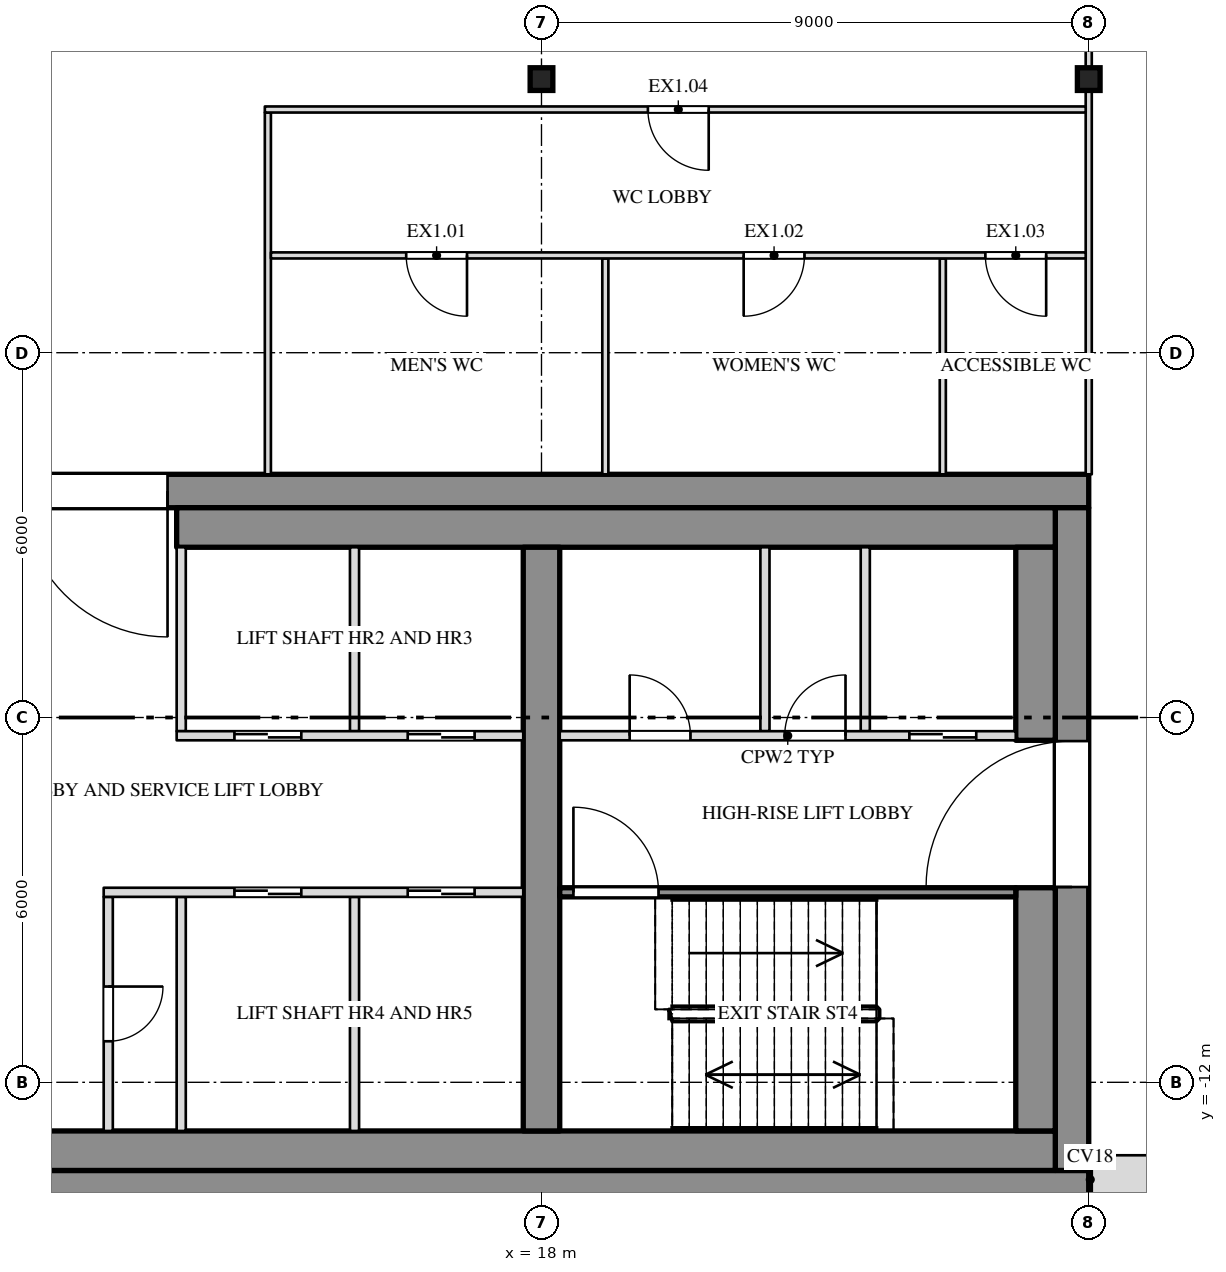
"""IFC4 building model, lengths in metres.
Left out: names, types, materials, properties, quantities, classifications, styles, units other than length and angle.
Written with IfcOpenShell. Run it as: python <this file> out.ifc"""

import sys

from ifc_helpers import new_model, si_unit, direction, frame, frame_2d, origin, origin_2d, place, context, subcontext, project, spatial, rectangle, i_section, extrude, element, fill, save


model = new_model("IFC4")
c1 = context("Model", 3, precision=1e-05, world=origin(), true_north=direction((0.0, 1.0)))
c2 = subcontext(c1, "Body", "Model", "MODEL_VIEW")
j1 = project(units=[si_unit("LENGTHUNIT", "METRE"), si_unit("PLANEANGLEUNIT", "RADIAN")], contexts=[c1])
p1 = place(None, origin())
s1 = spatial("IfcSite", under=j1, at=p1, CompositionType="ELEMENT")
p2 = place(p1, origin())
s2 = spatial("IfcBuilding", under=s1, at=p2, CompositionType="ELEMENT")
p3 = place(p2, frame((0.0, 0.0, 272.5)))
s3 = spatial("IfcBuildingStorey", under=s2, at=p3, CompositionType="ELEMENT", Elevation=272.5)
for number, where, z_axis, x_axis in (
    (1, (18.0, 4.5, 0.0), (0.0, 0.0, 1.0), (1.0, 0.0, 0.0)),
    (2, (27.0, 4.5, 0.0), (0.0, 0.0, 1.0), (1.0, 0.0, 0.0)),
):
    element("IfcColumn", number, at=place(p3, frame(where, z_axis=z_axis, x_axis=x_axis)), inside=s3, PredefinedType="COLUMN", context=c2, shape_type="SweptSolid", body=[
        extrude(i_section(OverallWidth=0.373, OverallDepth=0.373, WebThickness=0.016, FlangeThickness=0.026, at=origin_2d()), origin(), (0.0, 0.0, 1.0), 4.0),
    ])
p4 = place(p3, frame((-27.0, -2.275, 0.0), z_axis=(0.0, 0.0, 1.0), x_axis=(1.0, 0.0, 0.0)))
e3 = element("IfcWall", 3, at=p4, inside=s3, PredefinedType="SHEAR", context=c2, shape_type="SweptSolid", body=[
    extrude(rectangle(XDim=54.0, YDim=0.55, at=frame_2d((27.0, 0.0))), origin(), (0.0, 0.0, 1.0), 3.78),
])
p5 = place(p4, frame((15.15, 0.0, 0.0)))
e4 = element("IfcOpeningElement", 4, at=p5, cuts=e3, PredefinedType="OPENING", context=c2, shape_type="SweptSolid", body=[
    extrude(rectangle(XDim=2.4, YDim=2.1, at=frame_2d((1.2, 1.05))), frame((0.0, 0.287, 0.0), z_axis=(0.0, -1.0, 0.0), x_axis=(1.0, 0.0, 0.0)), (0.0, 0.0, 1.0), 0.574),
])
p6 = place(p4, frame((36.45, 0.0, 0.0)))
e5 = element("IfcOpeningElement", 5, at=p6, cuts=e3, PredefinedType="OPENING", context=c2, shape_type="SweptSolid", body=[
    extrude(rectangle(XDim=2.4, YDim=2.1, at=frame_2d((1.2, 1.05))), frame((0.0, 0.287, 0.0), z_axis=(0.0, -1.0, 0.0), x_axis=(1.0, 0.0, 0.0)), (0.0, 0.0, 1.0), 0.574),
])
p7 = place(p3, frame((-27.0, -13.725, 0.0), z_axis=(0.0, 0.0, 1.0), x_axis=(1.0, 0.0, 0.0)))
e6 = element("IfcWall", 6, at=p7, inside=s3, PredefinedType="SHEAR", context=c2, shape_type="SweptSolid", body=[
    extrude(rectangle(XDim=54.0, YDim=0.55, at=frame_2d((27.0, 0.0))), origin(), (0.0, 0.0, 1.0), 3.78),
])
p8 = place(p3, frame((26.725, -13.45, 0.0), z_axis=(0.0, 0.0, 1.0), x_axis=(0.0, 1.0, 0.0)))
e7 = element("IfcWall", 7, at=p8, inside=s3, PredefinedType="SHEAR", context=c2, shape_type="SweptSolid", body=[
    extrude(rectangle(XDim=10.9, YDim=0.55, at=frame_2d((5.45, 0.0))), origin(), (0.0, 0.0, 1.0), 3.78),
])
p9 = place(p8, frame((4.662, 0.0, 0.0)))
e8 = element("IfcOpeningElement", 8, at=p9, cuts=e7, PredefinedType="OPENING", context=c2, shape_type="SweptSolid", body=[
    extrude(rectangle(XDim=2.4, YDim=2.1, at=frame_2d((1.2, 1.05))), frame((0.0, 0.287, 0.0), z_axis=(0.0, -1.0, 0.0), x_axis=(1.0, 0.0, 0.0)), (0.0, 0.0, 1.0), 0.574),
])
p10 = place(p3, frame((12.0, -2.875, 0.0), z_axis=(0.0, 0.0, 1.0), x_axis=(1.0, 0.0, 0.0)))
e9 = element("IfcWall", 9, at=p10, inside=s3, PredefinedType="SHEAR", context=c2, shape_type="SweptSolid", body=[
    extrude(rectangle(XDim=14.45, YDim=0.65, at=frame_2d((7.225, 0.0))), origin(), (0.0, 0.0, 1.0), 3.78),
])
p11 = place(p3, frame((-26.45, -13.125, 0.0), z_axis=(0.0, 0.0, 1.0), x_axis=(1.0, 0.0, 0.0)))
e10 = element("IfcWall", 10, at=p11, inside=s3, PredefinedType="SHEAR", context=c2, shape_type="SweptSolid", body=[
    extrude(rectangle(XDim=52.9, YDim=0.65, at=frame_2d((26.45, 0.0))), origin(), (0.0, 0.0, 1.0), 3.78),
])
p12 = place(p3, frame((26.125, -12.8, 0.0), z_axis=(0.0, 0.0, 1.0), x_axis=(0.0, 1.0, 0.0)))
e11 = element("IfcWall", 11, at=p12, inside=s3, PredefinedType="SHEAR", context=c2, shape_type="SweptSolid", body=[
    extrude(rectangle(XDim=4.0, YDim=0.65, at=frame_2d((2.0, 0.0))), origin(), (0.0, 0.0, 1.0), 3.78),
])
p13 = place(p3, frame((26.125, -6.375, 0.0), z_axis=(0.0, 0.0, 1.0), x_axis=(0.0, 1.0, 0.0)))
e12 = element("IfcWall", 12, at=p13, inside=s3, PredefinedType="SHEAR", context=c2, shape_type="SweptSolid", body=[
    extrude(rectangle(XDim=3.175, YDim=0.65, at=frame_2d((1.587, 0.0))), origin(), (0.0, 0.0, 1.0), 3.78),
])
p14 = place(p3, frame((18.0, -12.8, 0.0), z_axis=(0.0, 0.0, 1.0), x_axis=(0.0, 1.0, 0.0)))
e13 = element("IfcWall", 13, at=p14, inside=s3, PredefinedType="SHEAR", context=c2, shape_type="SweptSolid", body=[
    extrude(rectangle(XDim=9.6, YDim=0.6, at=frame_2d((4.8, 0.0))), origin(), (0.0, 0.0, 1.0), 3.78),
])
p15 = place(p3, frame((13.5, -2.0, 0.0), z_axis=(0.0, 0.0, 1.0), x_axis=(0.0, 1.0, 0.0)))
e14 = element("IfcWall", 14, at=p15, inside=s3, PredefinedType="PARTITIONING", context=c2, shape_type="SweptSolid", body=[
    extrude(rectangle(XDim=5.95, YDim=0.1, at=frame_2d((2.975, 0.0))), origin(), (0.0, 0.0, 1.0), 3.247),
])
for number, where, z_axis, x_axis in (
    (15, (19.05, -2.0, 0.0), (0.0, 0.0, 1.0), (0.0, 1.0, 0.0)),
    (16, (24.6, -2.0, 0.0), (0.0, 0.0, 1.0), (0.0, 1.0, 0.0)),
):
    element("IfcWall", number, at=place(p3, frame(where, z_axis=z_axis, x_axis=x_axis)), inside=s3, PredefinedType="PARTITIONING", context=c2, shape_type="SweptSolid", body=[
        extrude(rectangle(XDim=3.55, YDim=0.1, at=frame_2d((1.775, 0.0))), origin(), (0.0, 0.0, 1.0), 3.78),
    ])
p16 = place(p3, frame((27.0, -2.0, 0.0), z_axis=(0.0, 0.0, 1.0), x_axis=(0.0, 1.0, 0.0)))
e17 = element("IfcWall", 17, at=p16, inside=s3, PredefinedType="PARTITIONING", context=c2, shape_type="SweptSolid", body=[
    extrude(rectangle(XDim=6.313, YDim=0.1, at=frame_2d((3.157, 0.0))), origin(), (0.0, 0.0, 1.0), 3.247),
])
p17 = place(p3, frame((27.0, 4.687, 0.0), z_axis=(0.0, 0.0, 1.0), x_axis=(0.0, 1.0, 0.0)))
e18 = element("IfcWall", 18, at=p17, inside=s3, PredefinedType="PARTITIONING", context=c2, shape_type="SweptSolid", body=[
    extrude(rectangle(XDim=1.943, YDim=0.1, at=frame_2d((0.972, 0.0))), origin(), (0.0, 0.0, 1.0), 3.247),
])
p18 = place(p3, frame((13.55, 1.6, 0.0), z_axis=(0.0, 0.0, 1.0), x_axis=(1.0, 0.0, 0.0)))
e19 = element("IfcWall", 19, at=p18, inside=s3, PredefinedType="PARTITIONING", context=c2, shape_type="SweptSolid", body=[
    extrude(rectangle(XDim=13.4, YDim=0.1, at=frame_2d((6.7, 0.0))), origin(), (0.0, 0.0, 1.0), 3.78),
])
p19 = place(p18, frame((2.225, 0.0, 0.0)))
e20 = element("IfcOpeningElement", 20, at=p19, cuts=e19, PredefinedType="OPENING", context=c2, shape_type="SweptSolid", body=[
    extrude(rectangle(XDim=1.0, YDim=2.1, at=frame_2d((0.5, 1.05))), frame((0.0, 0.062, 0.0), z_axis=(0.0, -1.0, 0.0), x_axis=(1.0, 0.0, 0.0)), (0.0, 0.0, 1.0), 0.124),
])
p20 = place(p18, frame((7.775, 0.0, 0.0)))
e21 = element("IfcOpeningElement", 21, at=p20, cuts=e19, PredefinedType="OPENING", context=c2, shape_type="SweptSolid", body=[
    extrude(rectangle(XDim=1.0, YDim=2.1, at=frame_2d((0.5, 1.05))), frame((0.0, 0.062, 0.0), z_axis=(0.0, -1.0, 0.0), x_axis=(1.0, 0.0, 0.0)), (0.0, 0.0, 1.0), 0.124),
])
p21 = place(p18, frame((11.75, 0.0, 0.0)))
e22 = element("IfcOpeningElement", 22, at=p21, cuts=e19, PredefinedType="OPENING", context=c2, shape_type="SweptSolid", body=[
    extrude(rectangle(XDim=1.0, YDim=2.1, at=frame_2d((0.5, 1.05))), frame((0.0, 0.062, 0.0), z_axis=(0.0, -1.0, 0.0), x_axis=(1.0, 0.0, 0.0)), (0.0, 0.0, 1.0), 0.124),
])
p22 = place(p3, frame((13.45, 4.0, 0.0), z_axis=(0.0, 0.0, 1.0), x_axis=(1.0, 0.0, 0.0)))
e23 = element("IfcWall", 23, at=p22, inside=s3, PredefinedType="PARTITIONING", context=c2, shape_type="SweptSolid", body=[
    extrude(rectangle(XDim=13.5, YDim=0.1, at=frame_2d((6.75, 0.0))), origin(), (0.0, 0.0, 1.0), 3.78),
])
p23 = place(p22, frame((6.3, 0.0, 0.0)))
e24 = element("IfcOpeningElement", 24, at=p23, cuts=e23, PredefinedType="OPENING", context=c2, shape_type="SweptSolid", body=[
    extrude(rectangle(XDim=1.0, YDim=2.1, at=frame_2d((0.5, 1.05))), frame((0.0, 0.062, 0.0), z_axis=(0.0, -1.0, 0.0), x_axis=(1.0, 0.0, 0.0)), (0.0, 0.0, 1.0), 0.124),
])
p24 = place(p3, frame((27.05, -13.6, 0.0), z_axis=(0.0, 0.0, 1.0), x_axis=(1.0, 0.0, 0.0)))
e25 = element("IfcWall", 25, at=p24, inside=s3, PredefinedType="SOLIDWALL", context=c2, shape_type="SweptSolid", body=[
    extrude(rectangle(XDim=2.897, YDim=0.8, at=frame_2d((1.449, 0.0))), origin(), (0.0, 0.0, 1.0), 3.78),
])
for number, where, z_axis, x_axis in (
    (26, (12.075, -6.225, 0.0), (0.0, 0.0, 1.0), (0.0, 1.0, 0.0)),
    (27, (14.925, -6.225, 0.0), (0.0, 0.0, 1.0), (0.0, 1.0, 0.0)),
    (28, (21.675, -6.225, 0.0), (0.0, 0.0, 1.0), (0.0, 1.0, 0.0)),
    (29, (23.325, -6.225, 0.0), (0.0, 0.0, 1.0), (0.0, 1.0, 0.0)),
):
    element("IfcWall", number, at=place(p3, frame(where, z_axis=z_axis, x_axis=x_axis)), inside=s3, PredefinedType="PARTITIONING", context=c2, shape_type="SweptSolid", body=[
        extrude(rectangle(XDim=3.025, YDim=0.15, at=frame_2d((1.513, 0.0))), origin(), (0.0, 0.0, 1.0), 3.78),
    ])
p25 = place(p3, frame((10.875, -12.8, 0.0), z_axis=(0.0, 0.0, 1.0), x_axis=(0.0, 1.0, 0.0)))
e30 = element("IfcWall", 30, at=p25, inside=s3, PredefinedType="PARTITIONING", context=c2, shape_type="SweptSolid", body=[
    extrude(rectangle(XDim=3.85, YDim=0.15, at=frame_2d((1.925, 0.0))), origin(), (0.0, 0.0, 1.0), 3.78),
])
p26 = place(p25, frame((1.475, 0.0, 0.0)))
e31 = element("IfcOpeningElement", 31, at=p26, cuts=e30, PredefinedType="OPENING", context=c2, shape_type="SweptSolid", body=[
    extrude(rectangle(XDim=0.9, YDim=2.1, at=frame_2d((0.45, 1.05))), frame((0.0, 0.087, 0.0), z_axis=(0.0, -1.0, 0.0), x_axis=(1.0, 0.0, 0.0)), (0.0, 0.0, 1.0), 0.174),
])
for number, where, z_axis, x_axis in (
    (32, (12.075, -12.8, 0.0), (0.0, 0.0, 1.0), (0.0, 1.0, 0.0)),
    (33, (14.925, -12.8, 0.0), (0.0, 0.0, 1.0), (0.0, 1.0, 0.0)),
):
    element("IfcWall", number, at=place(p3, frame(where, z_axis=z_axis, x_axis=x_axis)), inside=s3, PredefinedType="PARTITIONING", context=c2, shape_type="SweptSolid", body=[
        extrude(rectangle(XDim=3.85, YDim=0.15, at=frame_2d((1.925, 0.0))), origin(), (0.0, 0.0, 1.0), 3.78),
    ])
p27 = place(p3, frame((12.0, -6.3, 0.0), z_axis=(0.0, 0.0, 1.0), x_axis=(1.0, 0.0, 0.0)))
e34 = element("IfcWall", 34, at=p27, inside=s3, PredefinedType="PARTITIONING", context=c2, shape_type="SweptSolid", body=[
    extrude(rectangle(XDim=5.7, YDim=0.15, at=frame_2d((2.85, 0.0))), origin(), (0.0, 0.0, 1.0), 3.78),
])
p28 = place(p27, frame((0.95, 0.0, 0.0)))
e35 = element("IfcOpeningElement", 35, at=p28, cuts=e34, PredefinedType="OPENING", context=c2, shape_type="SweptSolid", body=[
    extrude(rectangle(XDim=1.1, YDim=2.1, at=frame_2d((0.55, 1.05))), frame((0.0, 0.087, 0.0), z_axis=(0.0, -1.0, 0.0), x_axis=(1.0, 0.0, 0.0)), (0.0, 0.0, 1.0), 0.174),
])
p29 = place(p27, frame((3.8, 0.0, 0.0)))
e36 = element("IfcOpeningElement", 36, at=p29, cuts=e34, PredefinedType="OPENING", context=c2, shape_type="SweptSolid", body=[
    extrude(rectangle(XDim=1.1, YDim=2.1, at=frame_2d((0.55, 1.05))), frame((0.0, 0.087, 0.0), z_axis=(0.0, -1.0, 0.0), x_axis=(1.0, 0.0, 0.0)), (0.0, 0.0, 1.0), 0.174),
])
p30 = place(p3, frame((18.3, -6.3, 0.0), z_axis=(0.0, 0.0, 1.0), x_axis=(1.0, 0.0, 0.0)))
e37 = element("IfcWall", 37, at=p30, inside=s3, PredefinedType="PARTITIONING", context=c2, shape_type="SweptSolid", body=[
    extrude(rectangle(XDim=7.5, YDim=0.15, at=frame_2d((3.75, 0.0))), origin(), (0.0, 0.0, 1.0), 3.78),
])
p31 = place(p30, frame((1.15, 0.0, 0.0)))
e38 = element("IfcOpeningElement", 38, at=p31, cuts=e37, PredefinedType="OPENING", context=c2, shape_type="SweptSolid", body=[
    extrude(rectangle(XDim=1.0, YDim=2.1, at=frame_2d((0.5, 1.05))), frame((0.0, 0.087, 0.0), z_axis=(0.0, -1.0, 0.0), x_axis=(1.0, 0.0, 0.0)), (0.0, 0.0, 1.0), 0.174),
])
p32 = place(p30, frame((3.7, 0.0, 0.0)))
e39 = element("IfcOpeningElement", 39, at=p32, cuts=e37, PredefinedType="OPENING", context=c2, shape_type="SweptSolid", body=[
    extrude(rectangle(XDim=1.0, YDim=2.1, at=frame_2d((0.5, 1.05))), frame((0.0, 0.087, 0.0), z_axis=(0.0, -1.0, 0.0), x_axis=(1.0, 0.0, 0.0)), (0.0, 0.0, 1.0), 0.174),
])
p33 = place(p30, frame((5.75, 0.0, 0.0)))
e40 = element("IfcOpeningElement", 40, at=p33, cuts=e37, PredefinedType="OPENING", context=c2, shape_type="SweptSolid", body=[
    extrude(rectangle(XDim=1.1, YDim=2.1, at=frame_2d((0.55, 1.05))), frame((0.0, 0.087, 0.0), z_axis=(0.0, -1.0, 0.0), x_axis=(1.0, 0.0, 0.0)), (0.0, 0.0, 1.0), 0.174),
])
p34 = place(p3, frame((10.8, -8.875, 0.0), z_axis=(0.0, 0.0, 1.0), x_axis=(1.0, 0.0, 0.0)))
e41 = element("IfcWall", 41, at=p34, inside=s3, PredefinedType="PARTITIONING", context=c2, shape_type="SweptSolid", body=[
    extrude(rectangle(XDim=6.9, YDim=0.15, at=frame_2d((3.45, 0.0))), origin(), (0.0, 0.0, 1.0), 3.78),
])
p35 = place(p34, frame((2.15, 0.0, 0.0)))
e42 = element("IfcOpeningElement", 42, at=p35, cuts=e41, PredefinedType="OPENING", context=c2, shape_type="SweptSolid", body=[
    extrude(rectangle(XDim=1.1, YDim=2.1, at=frame_2d((0.55, 1.05))), frame((0.0, 0.087, 0.0), z_axis=(0.0, -1.0, 0.0), x_axis=(1.0, 0.0, 0.0)), (0.0, 0.0, 1.0), 0.174),
])
p36 = place(p34, frame((5.0, 0.0, 0.0)))
e43 = element("IfcOpeningElement", 43, at=p36, cuts=e41, PredefinedType="OPENING", context=c2, shape_type="SweptSolid", body=[
    extrude(rectangle(XDim=1.1, YDim=2.1, at=frame_2d((0.55, 1.05))), frame((0.0, 0.087, 0.0), z_axis=(0.0, -1.0, 0.0), x_axis=(1.0, 0.0, 0.0)), (0.0, 0.0, 1.0), 0.174),
])
p37 = place(p3, frame((18.3, -8.875, 0.0), z_axis=(0.0, 0.0, 1.0), x_axis=(1.0, 0.0, 0.0)))
e44 = element("IfcWall", 44, at=p37, inside=s3, PredefinedType="SHEAR", context=c2, shape_type="SweptSolid", body=[
    extrude(rectangle(XDim=7.5, YDim=0.15, at=frame_2d((3.75, 0.0))), origin(), (0.0, 0.0, 1.0), 3.78),
])
p38 = place(p37, frame((0.225, 0.0, 0.0)))
e45 = element("IfcOpeningElement", 45, at=p38, cuts=e44, PredefinedType="OPENING", context=c2, shape_type="SweptSolid", body=[
    extrude(rectangle(XDim=1.4, YDim=2.1, at=frame_2d((0.7, 1.05))), frame((0.0, 0.087, 0.0), z_axis=(0.0, -1.0, 0.0), x_axis=(1.0, 0.0, 0.0)), (0.0, 0.0, 1.0), 0.174),
])
p39 = place(p19, origin())
e46 = element("IfcDoor", 46, at=p39, inside=s3, OperationType="SINGLE_SWING_LEFT", PredefinedType="DOOR", context=c2, shape_type="SweptSolid", body=[
    extrude(rectangle(XDim=1.0, YDim=2.1, at=frame_2d((0.5, 1.05))), frame((0.0, 0.025, 0.0), z_axis=(0.0, -1.0, 0.0), x_axis=(1.0, 0.0, 0.0)), (0.0, 0.0, 1.0), 0.05),
])
fill(e20, e46)
p40 = place(p20, origin())
e47 = element("IfcDoor", 47, at=p40, inside=s3, OperationType="SINGLE_SWING_RIGHT", PredefinedType="DOOR", context=c2, shape_type="SweptSolid", body=[
    extrude(rectangle(XDim=1.0, YDim=2.1, at=frame_2d((0.5, 1.05))), frame((0.0, 0.025, 0.0), z_axis=(0.0, -1.0, 0.0), x_axis=(1.0, 0.0, 0.0)), (0.0, 0.0, 1.0), 0.05),
])
fill(e21, e47)
p41 = place(p21, origin())
e48 = element("IfcDoor", 48, at=p41, inside=s3, OperationType="SINGLE_SWING_LEFT", PredefinedType="DOOR", context=c2, shape_type="SweptSolid", body=[
    extrude(rectangle(XDim=1.0, YDim=2.1, at=frame_2d((0.5, 1.05))), frame((0.0, 0.025, 0.0), z_axis=(0.0, -1.0, 0.0), x_axis=(1.0, 0.0, 0.0)), (0.0, 0.0, 1.0), 0.05),
])
fill(e22, e48)
p42 = place(p23, origin())
e49 = element("IfcDoor", 49, at=p42, inside=s3, OperationType="SINGLE_SWING_LEFT", PredefinedType="DOOR", context=c2, shape_type="SweptSolid", body=[
    extrude(rectangle(XDim=1.0, YDim=2.1, at=frame_2d((0.5, 1.05))), frame((0.0, 0.025, 0.0), z_axis=(0.0, -1.0, 0.0), x_axis=(1.0, 0.0, 0.0)), (0.0, 0.0, 1.0), 0.05),
])
fill(e24, e49)
p43 = place(p6, origin())
e50 = element("IfcDoor", 50, at=p43, inside=s3, OperationType="DOUBLE_DOOR_SINGLE_SWING", PredefinedType="DOOR", context=c2, shape_type="SweptSolid", body=[
    extrude(rectangle(XDim=2.4, YDim=2.1, at=frame_2d((1.2, 1.05))), frame((0.0, 0.025, 0.0), z_axis=(0.0, -1.0, 0.0), x_axis=(1.0, 0.0, 0.0)), (0.0, 0.0, 1.0), 0.05),
])
fill(e5, e50)
p44 = place(p26, origin())
e51 = element("IfcDoor", 51, at=p44, inside=s3, OperationType="SINGLE_SWING_LEFT", PredefinedType="DOOR", context=c2, shape_type="SweptSolid", body=[
    extrude(rectangle(XDim=0.9, YDim=2.1, at=frame_2d((0.45, 1.05))), frame((0.0, 0.025, 0.0), z_axis=(0.0, -1.0, 0.0), x_axis=(1.0, 0.0, 0.0)), (0.0, 0.0, 1.0), 0.05),
])
fill(e31, e51)
p45 = place(p35, origin())
e52 = element("IfcDoor", 52, at=p45, inside=s3, OperationType="SLIDING_TO_RIGHT", PredefinedType="DOOR", context=c2, shape_type="SweptSolid", body=[
    extrude(rectangle(XDim=1.1, YDim=2.1, at=frame_2d((0.55, 1.05))), frame((0.0, 0.025, 0.0), z_axis=(0.0, -1.0, 0.0), x_axis=(1.0, 0.0, 0.0)), (0.0, 0.0, 1.0), 0.05),
])
fill(e42, e52)
p46 = place(p28, origin())
e53 = element("IfcDoor", 53, at=p46, inside=s3, OperationType="SLIDING_TO_LEFT", PredefinedType="DOOR", context=c2, shape_type="SweptSolid", body=[
    extrude(rectangle(XDim=1.1, YDim=2.1, at=frame_2d((0.55, 1.05))), frame((0.0, 0.025, 0.0), z_axis=(0.0, -1.0, 0.0), x_axis=(1.0, 0.0, 0.0)), (0.0, 0.0, 1.0), 0.05),
])
fill(e35, e53)
p47 = place(p36, origin())
e54 = element("IfcDoor", 54, at=p47, inside=s3, OperationType="SLIDING_TO_RIGHT", PredefinedType="DOOR", context=c2, shape_type="SweptSolid", body=[
    extrude(rectangle(XDim=1.1, YDim=2.1, at=frame_2d((0.55, 1.05))), frame((0.0, 0.025, 0.0), z_axis=(0.0, -1.0, 0.0), x_axis=(1.0, 0.0, 0.0)), (0.0, 0.0, 1.0), 0.05),
])
fill(e43, e54)
p48 = place(p29, origin())
e55 = element("IfcDoor", 55, at=p48, inside=s3, OperationType="SLIDING_TO_LEFT", PredefinedType="DOOR", context=c2, shape_type="SweptSolid", body=[
    extrude(rectangle(XDim=1.1, YDim=2.1, at=frame_2d((0.55, 1.05))), frame((0.0, 0.025, 0.0), z_axis=(0.0, -1.0, 0.0), x_axis=(1.0, 0.0, 0.0)), (0.0, 0.0, 1.0), 0.05),
])
fill(e36, e55)
p49 = place(p38, origin())
e56 = element("IfcDoor", 56, at=p49, inside=s3, OperationType="DOUBLE_DOOR_SINGLE_SWING", PredefinedType="DOOR", context=c2, shape_type="SweptSolid", body=[
    extrude(rectangle(XDim=1.4, YDim=2.1, at=frame_2d((0.7, 1.05))), frame((0.0, 0.025, 0.0), z_axis=(0.0, -1.0, 0.0), x_axis=(1.0, 0.0, 0.0)), (0.0, 0.0, 1.0), 0.05),
])
fill(e45, e56)
p50 = place(p31, origin())
e57 = element("IfcDoor", 57, at=p50, inside=s3, OperationType="SINGLE_SWING_LEFT", PredefinedType="DOOR", context=c2, shape_type="SweptSolid", body=[
    extrude(rectangle(XDim=1.0, YDim=2.1, at=frame_2d((0.5, 1.05))), frame((0.0, 0.025, 0.0), z_axis=(0.0, -1.0, 0.0), x_axis=(1.0, 0.0, 0.0)), (0.0, 0.0, 1.0), 0.05),
])
fill(e38, e57)
p51 = place(p32, origin())
e58 = element("IfcDoor", 58, at=p51, inside=s3, OperationType="SINGLE_SWING_RIGHT", PredefinedType="DOOR", context=c2, shape_type="SweptSolid", body=[
    extrude(rectangle(XDim=1.0, YDim=2.1, at=frame_2d((0.5, 1.05))), frame((0.0, 0.025, 0.0), z_axis=(0.0, -1.0, 0.0), x_axis=(1.0, 0.0, 0.0)), (0.0, 0.0, 1.0), 0.05),
])
fill(e39, e58)
p52 = place(p33, origin())
e59 = element("IfcDoor", 59, at=p52, inside=s3, OperationType="SLIDING_TO_LEFT", PredefinedType="DOOR", context=c2, shape_type="SweptSolid", body=[
    extrude(rectangle(XDim=1.1, YDim=2.1, at=frame_2d((0.55, 1.05))), frame((0.0, 0.025, 0.0), z_axis=(0.0, -1.0, 0.0), x_axis=(1.0, 0.0, 0.0)), (0.0, 0.0, 1.0), 0.05),
])
fill(e40, e59)
p53 = place(p9, origin())
e60 = element("IfcDoor", 60, at=p53, inside=s3, OperationType="DOUBLE_DOOR_SINGLE_SWING", PredefinedType="DOOR", context=c2, shape_type="SweptSolid", body=[
    extrude(rectangle(XDim=2.4, YDim=2.1, at=frame_2d((1.2, 1.05))), frame((0.0, 0.025, 0.0), z_axis=(0.0, -1.0, 0.0), x_axis=(1.0, 0.0, 0.0)), (0.0, 0.0, 1.0), 0.05),
])
fill(e8, e60)
save(model, sys.argv[1])
